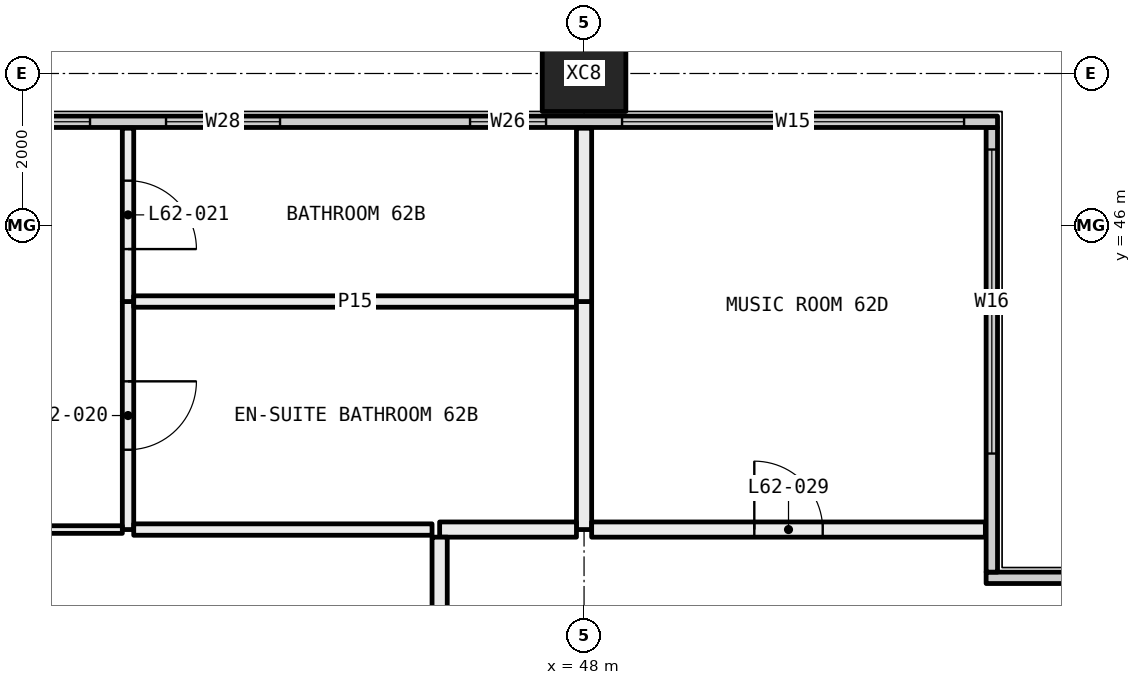
"""IFC4 building model, lengths in metres.
Left out: names, types, materials, properties, quantities, classifications, styles, units other than length and angle.
Written with IfcOpenShell. Run it as: python <this file> out.ifc"""

import sys

from ifc_helpers import new_model, si_unit, direction, frame, frame_2d, origin, origin_2d, place, context, subcontext, project, spatial, rectangle, hollow_rectangle, extrude, element, fill, save


model = new_model("IFC4")
c1 = context("Model", 3, precision=1e-05, world=origin(), true_north=direction((0.0, 1.0)))
c2 = subcontext(c1, "Body", "Model", "MODEL_VIEW")
j1 = project(units=[si_unit("LENGTHUNIT", "METRE"), si_unit("PLANEANGLEUNIT", "RADIAN")], contexts=[c1])
p1 = place(None, origin())
s1 = spatial("IfcSite", under=j1, at=p1, CompositionType="ELEMENT")
p2 = place(p1, origin())
s2 = spatial("IfcBuilding", under=s1, at=p2, CompositionType="ELEMENT")
p3 = place(p2, frame((0.0, 0.0, 231.75)))
s3 = spatial("IfcBuildingStorey", under=s2, at=p3, CompositionType="ELEMENT", Elevation=231.75)
p4 = place(p3, frame((48.0, 48.0, -0.4), z_axis=(0.0, 0.0, 1.0), x_axis=(1.0, 0.0, 0.0)))
e1 = element("IfcColumn", 1, at=p4, inside=s3, PredefinedType="COLUMN", context=c2, shape_type="SweptSolid", body=[
    extrude(hollow_rectangle(XDim=1.1, YDim=1.0, WallThickness=0.04, at=origin_2d()), origin(), (0.0, 0.0, 1.0), 3.45),
])
p5 = place(p3, frame((53.29, 41.365, 0.0), z_axis=(0.0, 0.0, 1.0), x_axis=(1.0, 0.0, 0.0)))
e2 = element("IfcWall", 2, at=p5, inside=s3, PredefinedType="ELEMENTEDWALL", context=c2, shape_type="SweptSolid", body=[
    extrude(rectangle(XDim=6.15, YDim=0.15, at=frame_2d((3.075, 0.0))), origin(), (0.0, 0.0, 1.0), 3.05),
])
p6 = place(p5, frame((1.71, 0.0, 0.45)))
e3 = element("IfcOpeningElement", 3, at=p6, cuts=e2, PredefinedType="OPENING", context=c2, shape_type="SweptSolid", body=[
    extrude(rectangle(XDim=4.0, YDim=2.55, at=frame_2d((2.0, 1.275))), frame((0.0, 0.085, 0.0), z_axis=(0.0, -1.0, 0.0), x_axis=(1.0, 0.0, 0.0)), (0.0, 0.0, 1.0), 0.17),
])
p7 = place(p3, frame((53.365, 41.44, 0.0), z_axis=(0.0, 0.0, 1.0), x_axis=(0.0, 1.0, 0.0)))
e4 = element("IfcWall", 4, at=p7, inside=s3, PredefinedType="ELEMENTEDWALL", context=c2, shape_type="SweptSolid", body=[
    extrude(rectangle(XDim=5.85, YDim=0.15, at=frame_2d((2.925, 0.0))), origin(), (0.0, 0.0, 1.0), 3.05),
])
p8 = place(p7, frame((1.56, 0.0, 0.45)))
e5 = element("IfcOpeningElement", 5, at=p8, cuts=e4, PredefinedType="OPENING", context=c2, shape_type="SweptSolid", body=[
    extrude(rectangle(XDim=4.0, YDim=2.55, at=frame_2d((2.0, 1.275))), frame((0.0, 0.085, 0.0), z_axis=(0.0, -1.0, 0.0), x_axis=(1.0, 0.0, 0.0)), (0.0, 0.0, 1.0), 0.17),
])
p9 = place(p3, frame((18.56, 47.365, 0.0), z_axis=(0.0, 0.0, 1.0), x_axis=(1.0, 0.0, 0.0)))
e6 = element("IfcWall", 6, at=p9, inside=s3, PredefinedType="ELEMENTEDWALL", context=c2, shape_type="SweptSolid", body=[
    extrude(rectangle(XDim=34.88, YDim=0.15, at=frame_2d((17.44, 0.0))), origin(), (0.0, 0.0, 1.0), 3.05),
])
p10 = place(p9, frame((0.44, 0.0, 0.45)))
e7 = element("IfcOpeningElement", 7, at=p10, cuts=e6, PredefinedType="OPENING", context=c2, shape_type="SweptSolid", body=[
    extrude(rectangle(XDim=4.5, YDim=2.55, at=frame_2d((2.25, 1.275))), frame((0.0, 0.085, 0.0), z_axis=(0.0, -1.0, 0.0), x_axis=(1.0, 0.0, 0.0)), (0.0, 0.0, 1.0), 0.17),
])
p11 = place(p9, frame((5.94, 0.0, 0.45)))
e8 = element("IfcOpeningElement", 8, at=p11, cuts=e6, PredefinedType="OPENING", context=c2, shape_type="SweptSolid", body=[
    extrude(rectangle(XDim=1.0, YDim=2.55, at=frame_2d((0.5, 1.275))), frame((0.0, 0.085, 0.0), z_axis=(0.0, -1.0, 0.0), x_axis=(1.0, 0.0, 0.0)), (0.0, 0.0, 1.0), 0.17),
])
p12 = place(p9, frame((9.44, 0.0, 0.45)))
e9 = element("IfcOpeningElement", 9, at=p12, cuts=e6, PredefinedType="OPENING", context=c2, shape_type="SweptSolid", body=[
    extrude(rectangle(XDim=1.5, YDim=2.55, at=frame_2d((0.75, 1.275))), frame((0.0, 0.085, 0.0), z_axis=(0.0, -1.0, 0.0), x_axis=(1.0, 0.0, 0.0)), (0.0, 0.0, 1.0), 0.17),
])
p13 = place(p9, frame((11.94, 0.0, 0.45)))
e10 = element("IfcOpeningElement", 10, at=p13, cuts=e6, PredefinedType="OPENING", context=c2, shape_type="SweptSolid", body=[
    extrude(rectangle(XDim=1.5, YDim=2.55, at=frame_2d((0.75, 1.275))), frame((0.0, 0.085, 0.0), z_axis=(0.0, -1.0, 0.0), x_axis=(1.0, 0.0, 0.0)), (0.0, 0.0, 1.0), 0.17),
])
p14 = place(p9, frame((15.94, 0.0, 0.45)))
e11 = element("IfcOpeningElement", 11, at=p14, cuts=e6, PredefinedType="OPENING", context=c2, shape_type="SweptSolid", body=[
    extrude(rectangle(XDim=1.0, YDim=2.55, at=frame_2d((0.5, 1.275))), frame((0.0, 0.085, 0.0), z_axis=(0.0, -1.0, 0.0), x_axis=(1.0, 0.0, 0.0)), (0.0, 0.0, 1.0), 0.17),
])
p15 = place(p9, frame((17.94, 0.0, 0.45)))
e12 = element("IfcOpeningElement", 12, at=p15, cuts=e6, PredefinedType="OPENING", context=c2, shape_type="SweptSolid", body=[
    extrude(rectangle(XDim=1.0, YDim=2.55, at=frame_2d((0.5, 1.275))), frame((0.0, 0.085, 0.0), z_axis=(0.0, -1.0, 0.0), x_axis=(1.0, 0.0, 0.0)), (0.0, 0.0, 1.0), 0.17),
])
p16 = place(p9, frame((21.44, 0.0, 0.45)))
e13 = element("IfcOpeningElement", 13, at=p16, cuts=e6, PredefinedType="OPENING", context=c2, shape_type="SweptSolid", body=[
    extrude(rectangle(XDim=1.5, YDim=2.55, at=frame_2d((0.75, 1.275))), frame((0.0, 0.085, 0.0), z_axis=(0.0, -1.0, 0.0), x_axis=(1.0, 0.0, 0.0)), (0.0, 0.0, 1.0), 0.17),
])
p17 = place(p9, frame((23.94, 0.0, 0.45)))
e14 = element("IfcOpeningElement", 14, at=p17, cuts=e6, PredefinedType="OPENING", context=c2, shape_type="SweptSolid", body=[
    extrude(rectangle(XDim=1.5, YDim=2.55, at=frame_2d((0.75, 1.275))), frame((0.0, 0.085, 0.0), z_axis=(0.0, -1.0, 0.0), x_axis=(1.0, 0.0, 0.0)), (0.0, 0.0, 1.0), 0.17),
])
p18 = place(p9, frame((27.94, 0.0, 0.45)))
e15 = element("IfcOpeningElement", 15, at=p18, cuts=e6, PredefinedType="OPENING", context=c2, shape_type="SweptSolid", body=[
    extrude(rectangle(XDim=1.0, YDim=2.55, at=frame_2d((0.5, 1.275))), frame((0.0, 0.085, 0.0), z_axis=(0.0, -1.0, 0.0), x_axis=(1.0, 0.0, 0.0)), (0.0, 0.0, 1.0), 0.17),
])
p19 = place(p9, frame((29.94, 0.0, 0.45)))
e16 = element("IfcOpeningElement", 16, at=p19, cuts=e6, PredefinedType="OPENING", context=c2, shape_type="SweptSolid", body=[
    extrude(rectangle(XDim=4.5, YDim=2.55, at=frame_2d((2.25, 1.275))), frame((0.0, 0.085, 0.0), z_axis=(0.0, -1.0, 0.0), x_axis=(1.0, 0.0, 0.0)), (0.0, 0.0, 1.0), 0.17),
])
p20 = place(p3, frame((42.0, 42.0, 0.0), z_axis=(0.0, 0.0, 1.0), x_axis=(0.0, 1.0, 0.0)))
e17 = element("IfcWall", 17, at=p20, inside=s3, PredefinedType="PARTITIONING", context=c2, shape_type="SweptSolid", body=[
    extrude(rectangle(XDim=3.0, YDim=0.15, at=frame_2d((1.5, 0.0))), origin(), (0.0, 0.0, 1.0), 3.05),
])
p21 = place(p20, frame((1.05, 0.0, 0.0)))
e18 = element("IfcOpeningElement", 18, at=p21, cuts=e17, PredefinedType="OPENING", context=c2, shape_type="SweptSolid", body=[
    extrude(rectangle(XDim=0.9, YDim=2.1, at=frame_2d((0.45, 1.05))), frame((0.0, 0.085, 0.0), z_axis=(0.0, -1.0, 0.0), x_axis=(1.0, 0.0, 0.0)), (0.0, 0.0, 1.0), 0.17),
])
p22 = place(p3, frame((42.0, 45.0, 0.0), z_axis=(0.0, 0.0, 1.0), x_axis=(0.0, 1.0, 0.0)))
e19 = element("IfcWall", 19, at=p22, inside=s3, PredefinedType="PARTITIONING", context=c2, shape_type="SweptSolid", body=[
    extrude(rectangle(XDim=2.28, YDim=0.15, at=frame_2d((1.14, 0.0))), origin(), (0.0, 0.0, 1.0), 3.05),
])
p23 = place(p22, frame((0.69, 0.0, 0.0)))
e20 = element("IfcOpeningElement", 20, at=p23, cuts=e19, PredefinedType="OPENING", context=c2, shape_type="SweptSolid", body=[
    extrude(rectangle(XDim=0.9, YDim=2.1, at=frame_2d((0.45, 1.05))), frame((0.0, 0.085, 0.0), z_axis=(0.0, -1.0, 0.0), x_axis=(1.0, 0.0, 0.0)), (0.0, 0.0, 1.0), 0.17),
])
p24 = place(p3, frame((40.5, 42.0, 0.0), z_axis=(0.0, 0.0, 1.0), x_axis=(1.0, 0.0, 0.0)))
e21 = element("IfcWall", 21, at=p24, inside=s3, PredefinedType="PARTITIONING", context=c2, shape_type="SweptSolid", body=[
    extrude(rectangle(XDim=1.425, YDim=0.1, at=frame_2d((0.712, 0.0))), origin(), (0.0, 0.0, 1.0), 3.05),
])
p25 = place(p3, frame((47.9, 45.0, 0.0), z_axis=(0.0, 0.0, 1.0), x_axis=(-1.0, 0.0, 0.0)))
e22 = element("IfcWall", 22, at=p25, inside=s3, PredefinedType="PARTITIONING", context=c2, shape_type="SweptSolid", body=[
    extrude(rectangle(XDim=5.825, YDim=0.15, at=frame_2d((2.913, 0.0))), origin(), (0.0, 0.0, 1.0), 3.05),
])
p26 = place(p3, frame((42.075, 42.0, 0.0), z_axis=(0.0, 0.0, 1.0), x_axis=(1.0, 0.0, 0.0)))
e23 = element("IfcWall", 23, at=p26, inside=s3, PredefinedType="PARTITIONING", context=c2, shape_type="SweptSolid", body=[
    extrude(rectangle(XDim=3.925, YDim=0.15, at=frame_2d((1.962, 0.0))), origin(), (0.0, 0.0, 1.0), 3.05),
])
p27 = place(p3, frame((48.0, 42.0, 0.0), z_axis=(0.0, 0.0, 1.0), x_axis=(0.0, 1.0, 0.0)))
e24 = element("IfcWall", 24, at=p27, inside=s3, PredefinedType="PARTITIONING", context=c2, shape_type="SweptSolid", body=[
    extrude(rectangle(XDim=3.0, YDim=0.2, at=frame_2d((1.5, 0.0))), origin(), (0.0, 0.0, 1.0), 3.05),
])
p28 = place(p3, frame((46.1, 42.0, 0.0), z_axis=(0.0, 0.0, 1.0), x_axis=(1.0, 0.0, 0.0)))
e25 = element("IfcWall", 25, at=p28, inside=s3, PredefinedType="PARTITIONING", context=c2, shape_type="SweptSolid", body=[
    extrude(rectangle(XDim=1.8, YDim=0.2, at=frame_2d((0.9, 0.0))), origin(), (0.0, 0.0, 1.0), 3.05),
])
p29 = place(p3, frame((48.0, 45.0, 0.0), z_axis=(0.0, 0.0, 1.0), x_axis=(0.0, 1.0, 0.0)))
e26 = element("IfcWall", 26, at=p29, inside=s3, PredefinedType="PARTITIONING", context=c2, shape_type="SweptSolid", body=[
    extrude(rectangle(XDim=2.28, YDim=0.2, at=frame_2d((1.14, 0.0))), origin(), (0.0, 0.0, 1.0), 3.05),
])
p30 = place(p3, frame((46.1, 36.1, 0.0), z_axis=(0.0, 0.0, 1.0), x_axis=(0.0, 1.0, 0.0)))
e27 = element("IfcWall", 27, at=p30, inside=s3, PredefinedType="PARTITIONING", context=c2, shape_type="SweptSolid", body=[
    extrude(rectangle(XDim=5.8, YDim=0.2, at=frame_2d((2.9, 0.0))), origin(), (0.0, 0.0, 1.0), 3.05),
])
p31 = place(p3, frame((48.1, 42.0, 0.0), z_axis=(0.0, 0.0, 1.0), x_axis=(1.0, 0.0, 0.0)))
e28 = element("IfcWall", 28, at=p31, inside=s3, PredefinedType="PARTITIONING", context=c2, shape_type="SweptSolid", body=[
    extrude(rectangle(XDim=5.18, YDim=0.2, at=frame_2d((2.59, 0.0))), origin(), (0.0, 0.0, 1.0), 3.05),
])
p32 = place(p31, frame((2.14, 0.0, 0.0)))
e29 = element("IfcOpeningElement", 29, at=p32, cuts=e28, PredefinedType="OPENING", context=c2, shape_type="SweptSolid", body=[
    extrude(rectangle(XDim=0.9, YDim=2.1, at=frame_2d((0.45, 1.05))), frame((0.0, 0.11, 0.0), z_axis=(0.0, -1.0, 0.0), x_axis=(1.0, 0.0, 0.0)), (0.0, 0.0, 1.0), 0.22),
])
p33 = place(p8, origin())
e30 = element("IfcWindow", 30, at=p33, inside=s3, PartitioningType="SINGLE_PANEL", PredefinedType="WINDOW", context=c2, shape_type="SweptSolid", body=[
    extrude(rectangle(XDim=4.0, YDim=2.55, at=frame_2d((2.0, 1.275))), frame((0.0, 0.03, 0.0), z_axis=(0.0, -1.0, 0.0), x_axis=(1.0, 0.0, 0.0)), (0.0, 0.0, 1.0), 0.06),
])
fill(e5, e30)
p34 = place(p16, origin())
e31 = element("IfcWindow", 31, at=p34, inside=s3, PartitioningType="SINGLE_PANEL", PredefinedType="WINDOW", context=c2, shape_type="SweptSolid", body=[
    extrude(rectangle(XDim=1.5, YDim=2.55, at=frame_2d((0.75, 1.275))), frame((0.0, 0.03, 0.0), z_axis=(0.0, -1.0, 0.0), x_axis=(1.0, 0.0, 0.0)), (0.0, 0.0, 1.0), 0.06),
])
fill(e13, e31)
p35 = place(p17, origin())
e32 = element("IfcWindow", 32, at=p35, inside=s3, PartitioningType="SINGLE_PANEL", PredefinedType="WINDOW", context=c2, shape_type="SweptSolid", body=[
    extrude(rectangle(XDim=1.5, YDim=2.55, at=frame_2d((0.75, 1.275))), frame((0.0, 0.03, 0.0), z_axis=(0.0, -1.0, 0.0), x_axis=(1.0, 0.0, 0.0)), (0.0, 0.0, 1.0), 0.06),
])
fill(e14, e32)
p36 = place(p18, origin())
e33 = element("IfcWindow", 33, at=p36, inside=s3, PartitioningType="SINGLE_PANEL", PredefinedType="WINDOW", context=c2, shape_type="SweptSolid", body=[
    extrude(rectangle(XDim=1.0, YDim=2.55, at=frame_2d((0.5, 1.275))), frame((0.0, 0.03, 0.0), z_axis=(0.0, -1.0, 0.0), x_axis=(1.0, 0.0, 0.0)), (0.0, 0.0, 1.0), 0.06),
])
fill(e15, e33)
p37 = place(p19, origin())
e34 = element("IfcWindow", 34, at=p37, inside=s3, PartitioningType="SINGLE_PANEL", PredefinedType="WINDOW", context=c2, shape_type="SweptSolid", body=[
    extrude(rectangle(XDim=4.5, YDim=2.55, at=frame_2d((2.25, 1.275))), frame((0.0, 0.03, 0.0), z_axis=(0.0, -1.0, 0.0), x_axis=(1.0, 0.0, 0.0)), (0.0, 0.0, 1.0), 0.06),
])
fill(e16, e34)
p38 = place(p21, frame((0.9, 0.0, 0.0), x_axis=(-1.0, 0.0, 0.0)))
e35 = element("IfcDoor", 35, at=p38, inside=s3, OperationType="SINGLE_SWING_RIGHT", PredefinedType="DOOR", context=c2, shape_type="SweptSolid", body=[
    extrude(rectangle(XDim=0.9, YDim=2.1, at=frame_2d((0.45, 1.05))), frame((0.0, 0.025, 0.0), z_axis=(0.0, -1.0, 0.0), x_axis=(1.0, 0.0, 0.0)), (0.0, 0.0, 1.0), 0.05),
])
fill(e18, e35)
p39 = place(p23, frame((0.9, 0.0, 0.0), x_axis=(-1.0, 0.0, 0.0)))
e36 = element("IfcDoor", 36, at=p39, inside=s3, OperationType="SINGLE_SWING_LEFT", PredefinedType="DOOR", context=c2, shape_type="SweptSolid", body=[
    extrude(rectangle(XDim=0.9, YDim=2.1, at=frame_2d((0.45, 1.05))), frame((0.0, 0.025, 0.0), z_axis=(0.0, -1.0, 0.0), x_axis=(1.0, 0.0, 0.0)), (0.0, 0.0, 1.0), 0.05),
])
fill(e20, e36)
p40 = place(p32, origin())
e37 = element("IfcDoor", 37, at=p40, inside=s3, OperationType="SINGLE_SWING_RIGHT", PredefinedType="DOOR", context=c2, shape_type="SweptSolid", body=[
    extrude(rectangle(XDim=0.9, YDim=2.1, at=frame_2d((0.45, 1.05))), frame((0.0, 0.025, 0.0), z_axis=(0.0, -1.0, 0.0), x_axis=(1.0, 0.0, 0.0)), (0.0, 0.0, 1.0), 0.05),
])
fill(e29, e37)
save(model, sys.argv[1])
